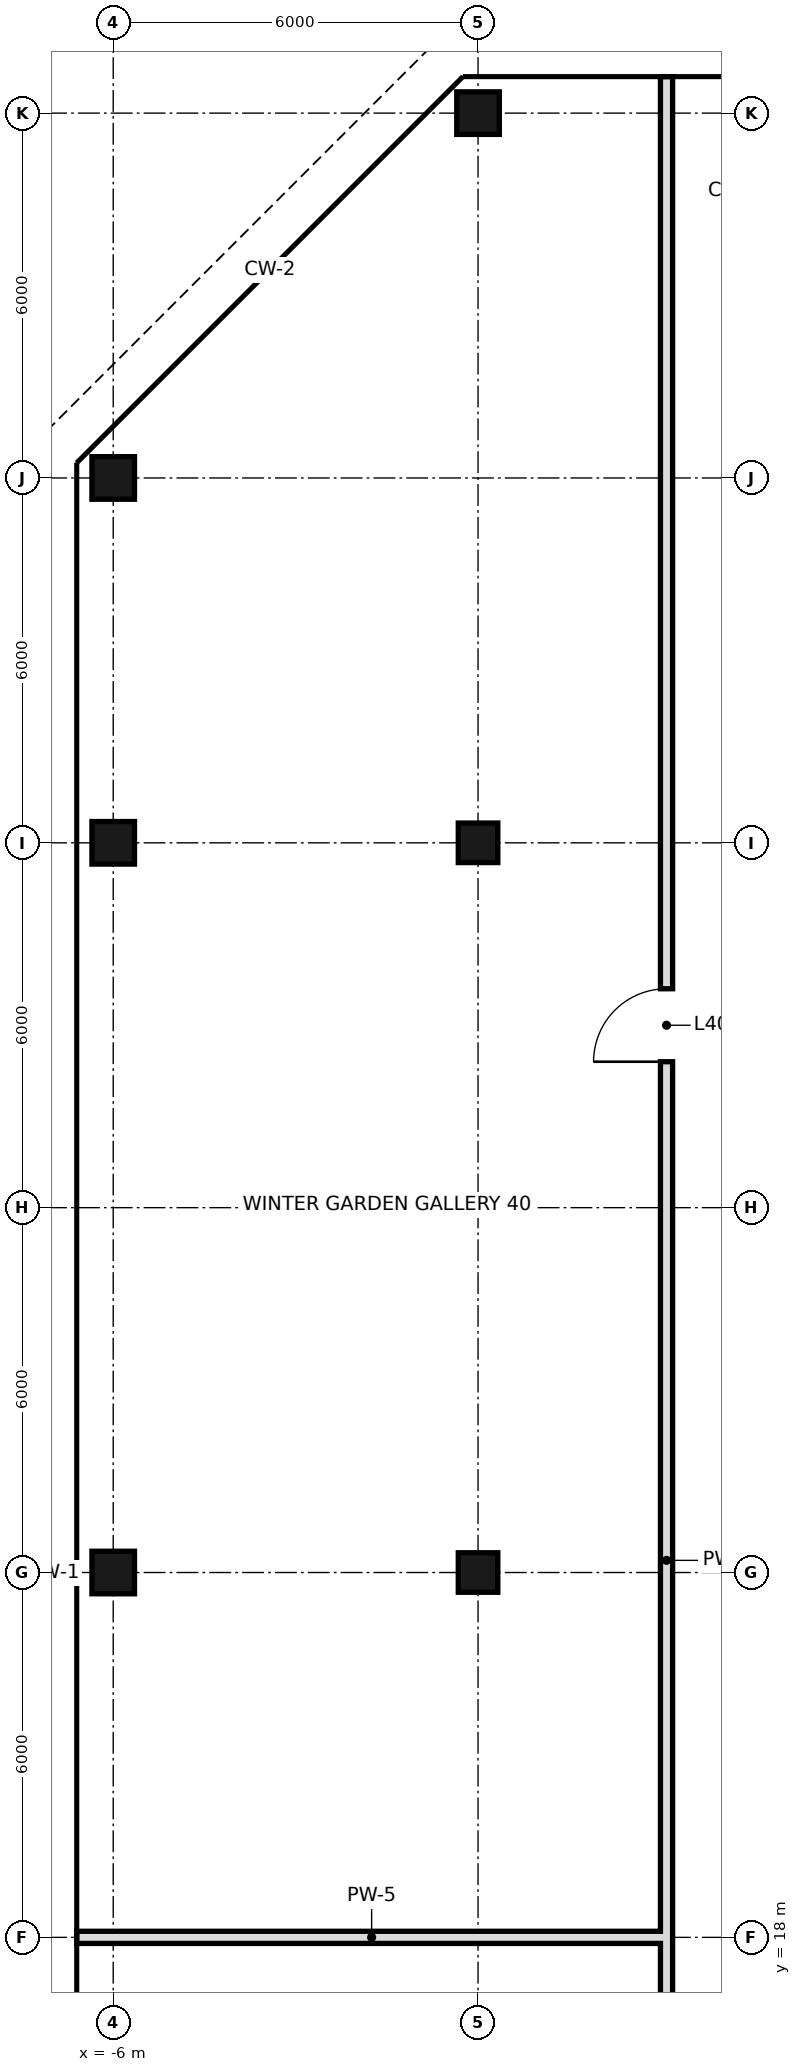
"""IFC4 building model, lengths in metres.
Left out: names, types, materials, properties, quantities, classifications, styles, units other than length and angle.
Written with IfcOpenShell. Run it as: python <this file> out.ifc"""

import sys

from ifc_helpers import new_model, si_unit, direction, frame, frame_2d, origin, origin_2d, place, context, subcontext, project, spatial, rectangle, hollow_rectangle, extrude, element, fill, save


model = new_model("IFC4")
c1 = context("Model", 3, precision=1e-05, world=origin(), true_north=direction((0.0, 1.0)))
c2 = subcontext(c1, "Body", "Model", "MODEL_VIEW")
j1 = project(units=[si_unit("LENGTHUNIT", "METRE"), si_unit("PLANEANGLEUNIT", "RADIAN")], contexts=[c1])
p1 = place(None, origin())
s1 = spatial("IfcSite", under=j1, at=p1, CompositionType="ELEMENT")
p2 = place(p1, origin())
s2 = spatial("IfcBuilding", under=s1, at=p2, CompositionType="ELEMENT")
p3 = place(p2, frame((0.0, 0.0, 174.4)))
s3 = spatial("IfcBuildingStorey", under=s2, at=p3, CompositionType="ELEMENT", Elevation=174.4)
for number, where, z_axis, x_axis in (
    (1, (-6.0, 24.0, 0.0), (0.0, 0.0, 1.0), (1.0, 0.0, 0.0)),
    (2, (-6.0, 36.0, 0.0), (0.0, 0.0, 1.0), (1.0, 0.0, 0.0)),
    (3, (-6.0, 42.0, 0.0), (0.0, 0.0, 1.0), (1.0, 0.0, 0.0)),
):
    element("IfcColumn", number, at=place(p3, frame(where, z_axis=z_axis, x_axis=x_axis)), inside=s3, PredefinedType="COLUMN", context=c2, shape_type="SweptSolid", body=[
        extrude(hollow_rectangle(XDim=0.7, YDim=0.7, WallThickness=0.036, at=origin_2d()), origin(), (0.0, 0.0, 1.0), 3.6),
    ])
for number, where, z_axis, x_axis in (
    (4, (0.0, 24.0, 0.0), (0.0, 0.0, 1.0), (1.0, 0.0, 0.0)),
    (5, (0.0, 36.0, 0.0), (0.0, 0.0, 1.0), (1.0, 0.0, 0.0)),
):
    element("IfcColumn", number, at=place(p3, frame(where, z_axis=z_axis, x_axis=x_axis)), inside=s3, PredefinedType="COLUMN", context=c2, shape_type="SweptSolid", body=[
        extrude(hollow_rectangle(XDim=0.65, YDim=0.65, WallThickness=0.032, at=origin_2d()), origin(), (0.0, 0.0, 1.0), 3.6),
    ])
p4 = place(p3, frame((0.0, 48.0, 0.0), z_axis=(0.0, 0.0, 1.0), x_axis=(1.0, 0.0, 0.0)))
e6 = element("IfcColumn", 6, at=p4, inside=s3, PredefinedType="COLUMN", context=c2, shape_type="SweptSolid", body=[
    extrude(hollow_rectangle(XDim=0.7, YDim=0.7, WallThickness=0.036, at=origin_2d()), origin(), (0.0, 0.0, 1.0), 3.6),
])
p5 = place(p3, frame((3.1, 15.3, 0.0), z_axis=(0.0, 0.0, 1.0), x_axis=(0.0, 1.0, 0.0)))
e7 = element("IfcWall", 7, at=p5, inside=s3, PredefinedType="SOLIDWALL", context=c2, shape_type="SweptSolid", body=[
    extrude(rectangle(XDim=33.3, YDim=0.2, at=frame_2d((16.65, 0.0))), origin(), (0.0, 0.0, 1.0), 2.72),
])
p6 = place(p5, frame((17.1, 0.0, 0.0)))
e8 = element("IfcOpeningElement", 8, at=p6, cuts=e7, PredefinedType="OPENING", context=c2, shape_type="SweptSolid", body=[
    extrude(rectangle(XDim=1.2, YDim=2.4, at=frame_2d((0.6, 1.2))), frame((0.0, 0.11, 0.0), z_axis=(0.0, -1.0, 0.0), x_axis=(1.0, 0.0, 0.0)), (0.0, 0.0, 1.0), 0.22),
])
p7 = place(p3, frame((-6.6, 18.0, 0.0), z_axis=(0.0, 0.0, 1.0), x_axis=(1.0, 0.0, 0.0)))
e9 = element("IfcWall", 9, at=p7, inside=s3, PredefinedType="SOLIDWALL", context=c2, shape_type="SweptSolid", body=[
    extrude(rectangle(XDim=9.7, YDim=0.2, at=frame_2d((4.85, 0.0))), origin(), (0.0, 0.0, 1.0), 2.72),
])
p8 = place(p6, origin())
e10 = element("IfcDoor", 10, at=p8, inside=s3, OperationType="SINGLE_SWING_LEFT", PredefinedType="DOOR", context=c2, shape_type="SweptSolid", body=[
    extrude(rectangle(XDim=1.2, YDim=2.4, at=frame_2d((0.6, 1.2))), frame((0.0, 0.025, 0.0), z_axis=(0.0, -1.0, 0.0), x_axis=(1.0, 0.0, 0.0)), (0.0, 0.0, 1.0), 0.05),
])
fill(e8, e10)
save(model, sys.argv[1])
